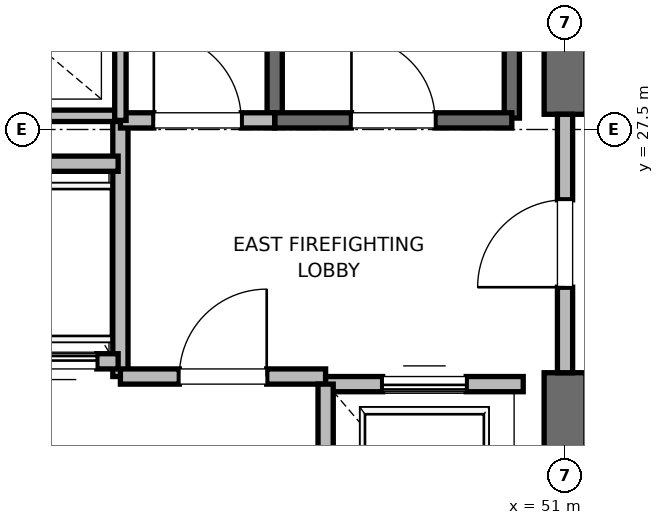
"""IFC4 building model, lengths in metres.
Left out: names, types, materials, properties, quantities, classifications, styles, units other than length and angle.
Written with IfcOpenShell. Run it as: python <this file> out.ifc"""

import sys

from ifc_helpers import new_model, si_unit, direction, frame, frame_2d, origin, place, context, subcontext, project, spatial, rectangle, extrude, element, fill, save


model = new_model("IFC4")
c1 = context("Model", 3, precision=1e-05, world=origin(), true_north=direction((0.0, 1.0)))
c2 = subcontext(c1, "Body", "Model", "MODEL_VIEW")
j1 = project(units=[si_unit("LENGTHUNIT", "METRE"), si_unit("PLANEANGLEUNIT", "RADIAN")], contexts=[c1])
p1 = place(None, origin())
s1 = spatial("IfcSite", under=j1, at=p1, CompositionType="ELEMENT")
p2 = place(p1, origin())
s2 = spatial("IfcBuilding", under=s1, at=p2, CompositionType="ELEMENT")
p3 = place(p2, frame((0.0, 0.0, 200.2)))
s3 = spatial("IfcBuildingStorey", under=s2, at=p3, CompositionType="ELEMENT", Elevation=200.2)
p4 = place(p3, frame((51.0, 18.5, 0.0), z_axis=(0.0, 0.0, 1.0), x_axis=(0.0, 1.0, 0.0)))
e1 = element("IfcWall", 1, at=p4, inside=s3, PredefinedType="SHEAR", context=c2, shape_type="SweptSolid", body=[
    extrude(rectangle(XDim=5.8, YDim=0.55, at=frame_2d((2.9, 0.0))), origin(), (0.0, 0.0, 1.0), 4.775),
])
p5 = place(p3, frame((51.0, 27.7, 0.0), z_axis=(0.0, 0.0, 1.0), x_axis=(0.0, 1.0, 0.0)))
e2 = element("IfcWall", 2, at=p5, inside=s3, PredefinedType="SHEAR", context=c2, shape_type="SweptSolid", body=[
    extrude(rectangle(XDim=8.8, YDim=0.55, at=frame_2d((4.4, 0.0))), origin(), (0.0, 0.0, 1.0), 4.775),
])
p6 = place(p3, frame((50.3, 27.65, 0.0), z_axis=(0.0, 0.0, 1.0), x_axis=(0.0, 1.0, 0.0)))
e3 = element("IfcWall", 3, at=p6, inside=s3, PredefinedType="SOLIDWALL", context=c2, shape_type="SweptSolid", body=[
    extrude(rectangle(XDim=8.15, YDim=0.2, at=frame_2d((4.075, 0.0))), origin(), (0.0, 0.0, 1.0), 4.775),
])
p7 = place(p3, frame((47.18, 27.62, 0.0), z_axis=(0.0, 0.0, 1.0), x_axis=(0.0, 1.0, 0.0)))
e4 = element("IfcWall", 4, at=p7, inside=s3, PredefinedType="SOLIDWALL", context=c2, shape_type="SweptSolid", body=[
    extrude(rectangle(XDim=8.18, YDim=0.2, at=frame_2d((4.09, 0.0))), origin(), (0.0, 0.0, 1.0), 4.775),
])
p8 = place(p3, frame((47.18, 27.62, 0.0), z_axis=(0.0, 0.0, 1.0), x_axis=(1.0, 0.0, 0.0)))
e5 = element("IfcWall", 5, at=p8, inside=s3, PredefinedType="SOLIDWALL", context=c2, shape_type="SweptSolid", body=[
    extrude(rectangle(XDim=3.12, YDim=0.2, at=frame_2d((1.56, 0.0))), origin(), (0.0, 0.0, 1.0), 4.775),
])
p9 = place(p8, frame((1.01, 0.0, 0.0)))
e6 = element("IfcOpeningElement", 6, at=p9, cuts=e5, PredefinedType="OPENING", context=c2, shape_type="SweptSolid", body=[
    extrude(rectangle(XDim=1.1, YDim=2.15, at=frame_2d((0.55, 1.075))), frame((0.0, 0.1, 0.0), z_axis=(0.0, -1.0, 0.0), x_axis=(1.0, 0.0, 0.0)), (0.0, 0.0, 1.0), 0.2),
])
p10 = place(p3, frame((45.15, 24.25, 0.0), z_axis=(0.0, 0.0, 1.0), x_axis=(0.0, 1.0, 0.0)))
e7 = element("IfcWall", 7, at=p10, inside=s3, PredefinedType="PARTITIONING", context=c2, shape_type="SweptSolid", body=[
    extrude(rectangle(XDim=3.37, YDim=0.2, at=frame_2d((1.685, 0.0))), origin(), (0.0, 0.0, 1.0), 4.775),
])
p11 = place(p3, frame((45.15, 24.25, 0.0), z_axis=(0.0, 0.0, 1.0), x_axis=(1.0, 0.0, 0.0)))
e8 = element("IfcWall", 8, at=p11, inside=s3, PredefinedType="PARTITIONING", context=c2, shape_type="SweptSolid", body=[
    extrude(rectangle(XDim=2.7, YDim=0.2, at=frame_2d((1.35, 0.0))), origin(), (0.0, 0.0, 1.0), 4.775),
])
p12 = place(p11, frame((0.775, 0.0, 0.0)))
e9 = element("IfcOpeningElement", 9, at=p12, cuts=e8, PredefinedType="OPENING", context=c2, shape_type="SweptSolid", body=[
    extrude(rectangle(XDim=1.15, YDim=2.2, at=frame_2d((0.575, 1.1))), frame((0.0, 0.1, 0.0), z_axis=(0.0, -1.0, 0.0), x_axis=(1.0, 0.0, 0.0)), (0.0, 0.0, 1.0), 0.2),
])
p13 = place(p3, frame((45.15, 27.62, 0.0), z_axis=(0.0, 0.0, 1.0), x_axis=(1.0, 0.0, 0.0)))
e10 = element("IfcWall", 10, at=p13, inside=s3, PredefinedType="PARTITIONING", context=c2, shape_type="SweptSolid", body=[
    extrude(rectangle(XDim=2.03, YDim=0.2, at=frame_2d((1.015, 0.0))), origin(), (0.0, 0.0, 1.0), 4.775),
])
p14 = place(p13, frame((0.44, 0.0, 0.0)))
e11 = element("IfcOpeningElement", 11, at=p14, cuts=e10, PredefinedType="OPENING", context=c2, shape_type="SweptSolid", body=[
    extrude(rectangle(XDim=1.15, YDim=2.2, at=frame_2d((0.575, 1.1))), frame((0.0, 0.1, 0.0), z_axis=(0.0, -1.0, 0.0), x_axis=(1.0, 0.0, 0.0)), (0.0, 0.0, 1.0), 0.2),
])
p15 = place(p3, frame((51.0, 24.3, 0.0), z_axis=(0.0, 0.0, 1.0), x_axis=(0.0, 1.0, 0.0)))
e12 = element("IfcWall", 12, at=p15, inside=s3, PredefinedType="PARTITIONING", context=c2, shape_type="SweptSolid", body=[
    extrude(rectangle(XDim=3.4, YDim=0.2, at=frame_2d((1.7, 0.0))), origin(), (0.0, 0.0, 1.0), 3.755),
])
p16 = place(p15, frame((1.125, 0.0, 0.0)))
e13 = element("IfcOpeningElement", 13, at=p16, cuts=e12, PredefinedType="OPENING", context=c2, shape_type="SweptSolid", body=[
    extrude(rectangle(XDim=1.15, YDim=2.2, at=frame_2d((0.575, 1.1))), frame((0.0, 0.1, 0.0), z_axis=(0.0, -1.0, 0.0), x_axis=(1.0, 0.0, 0.0)), (0.0, 0.0, 1.0), 0.2),
])
p17 = place(p3, frame((50.45, 24.15, 0.0), z_axis=(0.0, 0.0, 1.0), x_axis=(-1.0, 0.0, 0.0)))
e14 = element("IfcWall", 14, at=p17, inside=s3, PredefinedType="SOLIDWALL", context=c2, shape_type="SweptSolid", body=[
    extrude(rectangle(XDim=2.6, YDim=0.2, at=frame_2d((1.3, 0.0))), origin(), (0.0, 0.0, 1.0), 3.755),
])
p18 = place(p17, frame((0.75, 0.0, 0.0)))
e15 = element("IfcOpeningElement", 15, at=p18, cuts=e14, PredefinedType="OPENING", context=c2, shape_type="SweptSolid", body=[
    extrude(rectangle(XDim=1.1, YDim=2.2, at=frame_2d((0.55, 1.1))), frame((0.0, 0.1, 0.0), z_axis=(0.0, -1.0, 0.0), x_axis=(1.0, 0.0, 0.0)), (0.0, 0.0, 1.0), 0.2),
])
p19 = place(p3, frame((47.85, 24.15, 0.0), z_axis=(0.0, 0.0, 1.0), x_axis=(0.0, -1.0, 0.0)))
e16 = element("IfcWall", 16, at=p19, inside=s3, PredefinedType="SOLIDWALL", context=c2, shape_type="SweptSolid", body=[
    extrude(rectangle(XDim=3.0, YDim=0.2, at=frame_2d((1.5, 0.0))), origin(), (0.0, 0.0, 1.0), 4.775),
])
p20 = place(p3, frame((43.46, 24.45, 0.0), z_axis=(0.0, 0.0, 1.0), x_axis=(1.0, 0.0, 0.0)))
e17 = element("IfcWall", 17, at=p20, inside=s3, PredefinedType="SOLIDWALL", context=c2, shape_type="SweptSolid", body=[
    extrude(rectangle(XDim=1.66, YDim=0.2, at=frame_2d((0.83, 0.0))), origin(), (0.0, 0.0, 1.0), 4.775),
])
p21 = place(p20, frame((0.28, 0.0, 0.0)))
e18 = element("IfcOpeningElement", 18, at=p21, cuts=e17, PredefinedType="OPENING", context=c2, shape_type="SweptSolid", body=[
    extrude(rectangle(XDim=1.1, YDim=2.2, at=frame_2d((0.55, 1.1))), frame((0.0, 0.1, 0.0), z_axis=(0.0, -1.0, 0.0), x_axis=(1.0, 0.0, 0.0)), (0.0, 0.0, 1.0), 0.2),
])
p22 = place(p3, frame((45.12, 27.05, 0.0), z_axis=(0.0, 0.0, 1.0), x_axis=(-1.0, 0.0, 0.0)))
e19 = element("IfcWall", 19, at=p22, inside=s3, PredefinedType="SOLIDWALL", context=c2, shape_type="SweptSolid", body=[
    extrude(rectangle(XDim=1.66, YDim=0.2, at=frame_2d((0.83, 0.0))), origin(), (0.0, 0.0, 1.0), 4.775),
])
p23 = place(p3, frame((41.56, 27.68, 0.0), z_axis=(0.0, 0.0, 1.0), x_axis=(1.0, 0.0, 0.0)))
e20 = element("IfcWall", 20, at=p23, inside=s3, PredefinedType="PARTITIONING", context=c2, shape_type="SweptSolid", body=[
    extrude(rectangle(XDim=3.59, YDim=0.15, at=frame_2d((1.795, 0.0))), origin(), (0.0, 0.0, 1.0), 2.85),
])
p24 = place(p3, frame((45.15, 27.62, 0.0), z_axis=(0.0, 0.0, 1.0), x_axis=(0.0, 1.0, 0.0)))
e21 = element("IfcWall", 21, at=p24, inside=s3, PredefinedType="PARTITIONING", context=c2, shape_type="SweptSolid", body=[
    extrude(rectangle(XDim=3.1, YDim=0.15, at=frame_2d((1.55, 0.0))), origin(), (0.0, 0.0, 1.0), 2.85),
])
p25 = place(p9, origin())
e22 = element("IfcDoor", 22, at=p25, inside=s3, OperationType="SINGLE_SWING_LEFT", PredefinedType="DOOR", context=c2, shape_type="SweptSolid", body=[
    extrude(rectangle(XDim=1.1, YDim=2.15, at=frame_2d((0.55, 1.075))), frame((0.0, 0.025, 0.0), z_axis=(0.0, -1.0, 0.0), x_axis=(1.0, 0.0, 0.0)), (0.0, 0.0, 1.0), 0.05),
])
fill(e6, e22)
p26 = place(p12, origin())
e23 = element("IfcDoor", 23, at=p26, inside=s3, OperationType="SINGLE_SWING_RIGHT", PredefinedType="DOOR", context=c2, shape_type="SweptSolid", body=[
    extrude(rectangle(XDim=1.15, YDim=2.2, at=frame_2d((0.575, 1.1))), frame((0.0, 0.025, 0.0), z_axis=(0.0, -1.0, 0.0), x_axis=(1.0, 0.0, 0.0)), (0.0, 0.0, 1.0), 0.05),
])
fill(e9, e23)
p27 = place(p14, origin())
e24 = element("IfcDoor", 24, at=p27, inside=s3, OperationType="SINGLE_SWING_LEFT", PredefinedType="DOOR", context=c2, shape_type="SweptSolid", body=[
    extrude(rectangle(XDim=1.15, YDim=2.2, at=frame_2d((0.575, 1.1))), frame((0.0, 0.025, 0.0), z_axis=(0.0, -1.0, 0.0), x_axis=(1.0, 0.0, 0.0)), (0.0, 0.0, 1.0), 0.05),
])
fill(e11, e24)
p28 = place(p16, origin())
e25 = element("IfcDoor", 25, at=p28, inside=s3, OperationType="SINGLE_SWING_LEFT", PredefinedType="DOOR", context=c2, shape_type="SweptSolid", body=[
    extrude(rectangle(XDim=1.15, YDim=2.2, at=frame_2d((0.575, 1.1))), frame((0.0, 0.025, 0.0), z_axis=(0.0, -1.0, 0.0), x_axis=(1.0, 0.0, 0.0)), (0.0, 0.0, 1.0), 0.05),
])
fill(e13, e25)
p29 = place(p18, origin())
e26 = element("IfcDoor", 26, at=p29, inside=s3, OperationType="SLIDING_TO_RIGHT", PredefinedType="DOOR", context=c2, shape_type="SweptSolid", body=[
    extrude(rectangle(XDim=1.1, YDim=2.2, at=frame_2d((0.55, 1.1))), frame((0.0, 0.025, 0.0), z_axis=(0.0, -1.0, 0.0), x_axis=(1.0, 0.0, 0.0)), (0.0, 0.0, 1.0), 0.05),
])
fill(e15, e26)
p30 = place(p21, origin())
e27 = element("IfcDoor", 27, at=p30, inside=s3, OperationType="SLIDING_TO_RIGHT", PredefinedType="DOOR", context=c2, shape_type="SweptSolid", body=[
    extrude(rectangle(XDim=1.1, YDim=2.2, at=frame_2d((0.55, 1.1))), frame((0.0, 0.025, 0.0), z_axis=(0.0, -1.0, 0.0), x_axis=(1.0, 0.0, 0.0)), (0.0, 0.0, 1.0), 0.05),
])
fill(e18, e27)
save(model, sys.argv[1])
